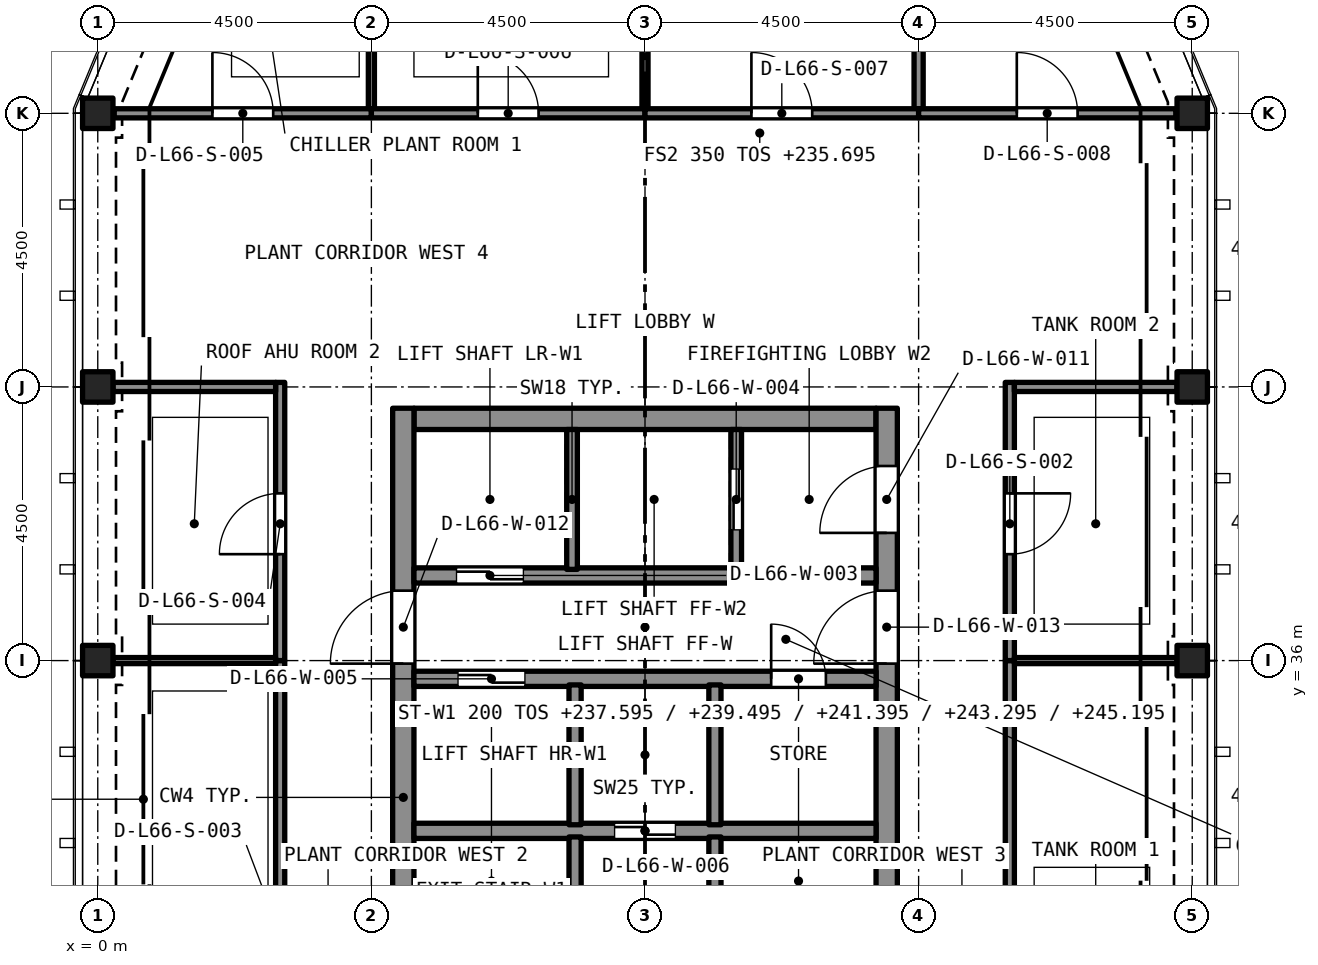
"""IFC4 building model, lengths in metres.
Left out: names, types, materials, properties, quantities, classifications, styles, units other than length and angle.
Written with IfcOpenShell. Run it as: python <this file> out.ifc"""

import sys

from ifc_helpers import new_model, si_unit, direction, frame, frame_2d, origin, origin_2d, place, context, subcontext, project, spatial, rectangle, hollow_rectangle, extrude, element, fill, save


model = new_model("IFC4")
c1 = context("Model", 3, precision=1e-05, world=origin(), true_north=direction((0.0, 1.0)))
c2 = subcontext(c1, "Body", "Model", "MODEL_VIEW")
j1 = project(units=[si_unit("LENGTHUNIT", "METRE"), si_unit("PLANEANGLEUNIT", "RADIAN")], contexts=[c1])
p1 = place(None, origin())
s1 = spatial("IfcSite", under=j1, at=p1, CompositionType="ELEMENT")
p2 = place(p1, origin())
s2 = spatial("IfcBuilding", under=s1, at=p2, CompositionType="ELEMENT")
p3 = place(p2, frame((0.0, 0.0, 235.695)))
s3 = spatial("IfcBuildingStorey", under=s2, at=p3, CompositionType="ELEMENT", Elevation=235.695)
p4 = place(p3, frame((5.2, 39.975, 0.0), z_axis=(0.0, 0.0, 1.0), x_axis=(1.0, 0.0, 0.0)))
e1 = element("IfcWall", 1, at=p4, inside=s3, PredefinedType="SOLIDWALL", context=c2, shape_type="SweptSolid", body=[
    extrude(rectangle(XDim=7.6, YDim=0.35, at=frame_2d((3.8, 0.0))), origin(), (0.0, 0.0, 1.0), 11.4),
])
p5 = place(p3, frame((5.025, 27.35, 0.0), z_axis=(0.0, 0.0, 1.0), x_axis=(0.0, 1.0, 0.0)))
e2 = element("IfcWall", 2, at=p5, inside=s3, PredefinedType="SOLIDWALL", context=c2, shape_type="SweptSolid", body=[
    extrude(rectangle(XDim=12.8, YDim=0.35, at=frame_2d((6.4, 0.0))), origin(), (0.0, 0.0, 1.0), 11.4),
])
p6 = place(p5, frame((8.6, 0.0, 0.0)))
e3 = element("IfcOpeningElement", 3, at=p6, cuts=e2, PredefinedType="OPENING", context=c2, shape_type="SweptSolid", body=[
    extrude(rectangle(XDim=1.2, YDim=2.1, at=frame_2d((0.6, 1.05))), frame((0.0, 0.185, 0.0), z_axis=(0.0, -1.0, 0.0), x_axis=(1.0, 0.0, 0.0)), (0.0, 0.0, 1.0), 0.37),
])
p7 = place(p3, frame((12.975, 27.35, 0.0), z_axis=(0.0, 0.0, 1.0), x_axis=(0.0, 1.0, 0.0)))
e4 = element("IfcWall", 4, at=p7, inside=s3, PredefinedType="SOLIDWALL", context=c2, shape_type="SweptSolid", body=[
    extrude(rectangle(XDim=12.8, YDim=0.35, at=frame_2d((6.4, 0.0))), origin(), (0.0, 0.0, 1.0), 11.4),
])
p8 = place(p7, frame((10.75, 0.0, 0.0)))
e5 = element("IfcOpeningElement", 5, at=p8, cuts=e4, PredefinedType="OPENING", context=c2, shape_type="SweptSolid", body=[
    extrude(rectangle(XDim=1.1, YDim=2.1, at=frame_2d((0.55, 1.05))), frame((0.0, 0.185, 0.0), z_axis=(0.0, -1.0, 0.0), x_axis=(1.0, 0.0, 0.0)), (0.0, 0.0, 1.0), 0.37),
])
p9 = place(p7, frame((8.6, 0.0, 0.0)))
e6 = element("IfcOpeningElement", 6, at=p9, cuts=e4, PredefinedType="OPENING", context=c2, shape_type="SweptSolid", body=[
    extrude(rectangle(XDim=1.2, YDim=2.1, at=frame_2d((0.6, 1.05))), frame((0.0, 0.185, 0.0), z_axis=(0.0, -1.0, 0.0), x_axis=(1.0, 0.0, 0.0)), (0.0, 0.0, 1.0), 0.37),
])
for number, where, z_axis, x_axis in (
    (7, (0.0, 36.0, 0.0), (0.0, 0.0, 1.0), (1.0, 0.0, 0.0)),
    (8, (18.0, 36.0, 0.0), (0.0, 0.0, 1.0), (1.0, 0.0, 0.0)),
    (9, (0.0, 40.5, 0.0), (0.0, 0.0, 1.0), (1.0, 0.0, 0.0)),
    (10, (18.0, 40.5, 0.0), (0.0, 0.0, 1.0), (1.0, 0.0, 0.0)),
    (11, (0.0, 45.0, 0.0), (0.0, 0.0, 1.0), (1.0, 0.0, 0.0)),
    (12, (18.0, 45.0, 0.0), (0.0, 0.0, 1.0), (1.0, 0.0, 0.0)),
):
    element("IfcColumn", number, at=place(p3, frame(where, z_axis=z_axis, x_axis=x_axis)), inside=s3, PredefinedType="COLUMN", context=c2, shape_type="SweptSolid", body=[
        extrude(hollow_rectangle(XDim=0.5, YDim=0.5, WallThickness=0.04, at=origin_2d()), origin(), (0.0, 0.0, 1.0), 11.4),
    ])
p10 = place(p3, frame((5.2, 33.2, 0.0), z_axis=(0.0, 0.0, 1.0), x_axis=(1.0, 0.0, 0.0)))
e13 = element("IfcWall", 13, at=p10, inside=s3, PredefinedType="SOLIDWALL", context=c2, shape_type="SweptSolid", body=[
    extrude(rectangle(XDim=7.6, YDim=0.25, at=frame_2d((3.8, 0.0))), origin(), (0.0, 0.0, 1.0), 11.05),
])
p11 = place(p10, frame((3.3, 0.0, 0.0)))
e14 = element("IfcOpeningElement", 14, at=p11, cuts=e13, PredefinedType="OPENING", context=c2, shape_type="SweptSolid", body=[
    extrude(rectangle(XDim=1.0, YDim=2.1, at=frame_2d((0.5, 1.05))), frame((0.0, 0.135, 0.0), z_axis=(0.0, -1.0, 0.0), x_axis=(1.0, 0.0, 0.0)), (0.0, 0.0, 1.0), 0.27),
])
p12 = place(p3, frame((5.2, 35.7, 0.0), z_axis=(0.0, 0.0, 1.0), x_axis=(1.0, 0.0, 0.0)))
e15 = element("IfcWall", 15, at=p12, inside=s3, PredefinedType="SOLIDWALL", context=c2, shape_type="SweptSolid", body=[
    extrude(rectangle(XDim=7.6, YDim=0.25, at=frame_2d((3.8, 0.0))), origin(), (0.0, 0.0, 1.0), 11.05),
])
p13 = place(p12, frame((0.725, 0.0, 0.0)))
e16 = element("IfcOpeningElement", 16, at=p13, cuts=e15, PredefinedType="OPENING", context=c2, shape_type="SweptSolid", body=[
    extrude(rectangle(XDim=1.1, YDim=2.4, at=frame_2d((0.55, 1.2))), frame((0.0, 0.135, 0.0), z_axis=(0.0, -1.0, 0.0), x_axis=(1.0, 0.0, 0.0)), (0.0, 0.0, 1.0), 0.27),
])
p14 = place(p12, frame((5.875, 0.0, 0.0)))
e17 = element("IfcOpeningElement", 17, at=p14, cuts=e15, PredefinedType="OPENING", context=c2, shape_type="SweptSolid", body=[
    extrude(rectangle(XDim=0.9, YDim=2.1, at=frame_2d((0.45, 1.05))), frame((0.0, 0.135, 0.0), z_axis=(0.0, -1.0, 0.0), x_axis=(1.0, 0.0, 0.0)), (0.0, 0.0, 1.0), 0.27),
])
p15 = place(p3, frame((5.2, 37.4, 0.0), z_axis=(0.0, 0.0, 1.0), x_axis=(1.0, 0.0, 0.0)))
e18 = element("IfcWall", 18, at=p15, inside=s3, PredefinedType="SOLIDWALL", context=c2, shape_type="SweptSolid", body=[
    extrude(rectangle(XDim=7.6, YDim=0.25, at=frame_2d((3.8, 0.0))), origin(), (0.0, 0.0, 1.0), 11.05),
])
p16 = place(p15, frame((0.7, 0.0, 0.0)))
e19 = element("IfcOpeningElement", 19, at=p16, cuts=e18, PredefinedType="OPENING", context=c2, shape_type="SweptSolid", body=[
    extrude(rectangle(XDim=1.1, YDim=2.4, at=frame_2d((0.55, 1.2))), frame((0.0, 0.135, 0.0), z_axis=(0.0, -1.0, 0.0), x_axis=(1.0, 0.0, 0.0)), (0.0, 0.0, 1.0), 0.27),
])
p17 = place(p3, frame((7.85, 27.7, 0.0), z_axis=(0.0, 0.0, 1.0), x_axis=(0.0, 1.0, 0.0)))
e20 = element("IfcWall", 20, at=p17, inside=s3, PredefinedType="SOLIDWALL", context=c2, shape_type="SweptSolid", body=[
    extrude(rectangle(XDim=5.4, YDim=0.2, at=frame_2d((2.7, 0.0))), origin(), (0.0, 0.0, 1.0), 11.05),
])
p18 = place(p17, frame((0.2, 0.0, 0.0)))
e21 = element("IfcOpeningElement", 21, at=p18, cuts=e20, PredefinedType="OPENING", context=c2, shape_type="SweptSolid", body=[
    extrude(rectangle(XDim=0.9, YDim=2.1, at=frame_2d((0.45, 1.05))), frame((0.0, 0.11, 0.0), z_axis=(0.0, -1.0, 0.0), x_axis=(1.0, 0.0, 0.0)), (0.0, 0.0, 1.0), 0.22),
])
p19 = place(p3, frame((10.15, 27.7, 0.0), z_axis=(0.0, 0.0, 1.0), x_axis=(0.0, 1.0, 0.0)))
e22 = element("IfcWall", 22, at=p19, inside=s3, PredefinedType="SOLIDWALL", context=c2, shape_type="SweptSolid", body=[
    extrude(rectangle(XDim=5.4, YDim=0.2, at=frame_2d((2.7, 0.0))), origin(), (0.0, 0.0, 1.0), 11.05),
])
p20 = place(p19, frame((0.2, 0.0, 0.0)))
e23 = element("IfcOpeningElement", 23, at=p20, cuts=e22, PredefinedType="OPENING", context=c2, shape_type="SweptSolid", body=[
    extrude(rectangle(XDim=0.9, YDim=2.1, at=frame_2d((0.45, 1.05))), frame((0.0, 0.11, 0.0), z_axis=(0.0, -1.0, 0.0), x_axis=(1.0, 0.0, 0.0)), (0.0, 0.0, 1.0), 0.22),
])
for number, where, z_axis, x_axis in (
    (24, (7.85, 33.3, 0.0), (0.0, 0.0, 1.0), (0.0, 1.0, 0.0)),
    (25, (10.15, 33.3, 0.0), (0.0, 0.0, 1.0), (0.0, 1.0, 0.0)),
):
    element("IfcWall", number, at=place(p3, frame(where, z_axis=z_axis, x_axis=x_axis)), inside=s3, PredefinedType="SOLIDWALL", context=c2, shape_type="SweptSolid", body=[
        extrude(rectangle(XDim=2.3, YDim=0.2, at=frame_2d((1.15, 0.0))), origin(), (0.0, 0.0, 1.0), 11.05),
    ])
p21 = place(p3, frame((7.8, 37.5, 0.0), z_axis=(0.0, 0.0, 1.0), x_axis=(0.0, 1.0, 0.0)))
e26 = element("IfcWall", 26, at=p21, inside=s3, PredefinedType="SOLIDWALL", context=c2, shape_type="SweptSolid", body=[
    extrude(rectangle(XDim=2.3, YDim=0.175, at=frame_2d((1.15, 0.0))), origin(), (0.0, 0.0, 1.0), 11.05),
])
p22 = place(p3, frame((10.5, 37.5, 0.0), z_axis=(0.0, 0.0, 1.0), x_axis=(0.0, 1.0, 0.0)))
e27 = element("IfcWall", 27, at=p22, inside=s3, PredefinedType="SOLIDWALL", context=c2, shape_type="SweptSolid", body=[
    extrude(rectangle(XDim=2.3, YDim=0.175, at=frame_2d((1.15, 0.0))), origin(), (0.0, 0.0, 1.0), 11.05),
])
p23 = place(p22, frame((0.65, 0.0, 0.0)))
e28 = element("IfcOpeningElement", 28, at=p23, cuts=e27, PredefinedType="OPENING", context=c2, shape_type="SweptSolid", body=[
    extrude(rectangle(XDim=1.0, YDim=2.1, at=frame_2d((0.5, 1.05))), frame((0.0, 0.097, 0.0), z_axis=(0.0, -1.0, 0.0), x_axis=(1.0, 0.0, 0.0)), (0.0, 0.0, 1.0), 0.195),
])
p24 = place(p3, frame((15.0, 36.0, 0.0), z_axis=(0.0, 0.0, 1.0), x_axis=(0.0, -1.0, 0.0)))
e29 = element("IfcWall", 29, at=p24, inside=s3, PredefinedType="PARTITIONING", context=c2, shape_type="SweptSolid", body=[
    extrude(rectangle(XDim=9.075, YDim=0.15, at=frame_2d((4.538, 0.0))), origin(), (0.0, 0.0, 1.0), 11.05),
])
p25 = place(p24, frame((3.75, 0.0, 0.0)))
e30 = element("IfcOpeningElement", 30, at=p25, cuts=e29, PredefinedType="OPENING", context=c2, shape_type="SweptSolid", body=[
    extrude(rectangle(XDim=1.5, YDim=2.4, at=frame_2d((0.75, 1.2))), frame((0.0, 0.085, 0.0), z_axis=(0.0, -1.0, 0.0), x_axis=(1.0, 0.0, 0.0)), (0.0, 0.0, 1.0), 0.17),
])
p26 = place(p3, frame((15.0, 40.575, 0.0), z_axis=(0.0, 0.0, 1.0), x_axis=(0.0, -1.0, 0.0)))
e31 = element("IfcWall", 31, at=p26, inside=s3, PredefinedType="PARTITIONING", context=c2, shape_type="SweptSolid", body=[
    extrude(rectangle(XDim=4.575, YDim=0.15, at=frame_2d((2.288, 0.0))), origin(), (0.0, 0.0, 1.0), 11.05),
])
p27 = place(p26, frame((1.825, 0.0, 0.0)))
e32 = element("IfcOpeningElement", 32, at=p27, cuts=e31, PredefinedType="OPENING", context=c2, shape_type="SweptSolid", body=[
    extrude(rectangle(XDim=1.0, YDim=2.1, at=frame_2d((0.5, 1.05))), frame((0.0, 0.085, 0.0), z_axis=(0.0, -1.0, 0.0), x_axis=(1.0, 0.0, 0.0)), (0.0, 0.0, 1.0), 0.17),
])
p28 = place(p3, frame((3.0, 26.925, 0.0), z_axis=(0.0, 0.0, 1.0), x_axis=(0.0, 1.0, 0.0)))
e33 = element("IfcWall", 33, at=p28, inside=s3, PredefinedType="PARTITIONING", context=c2, shape_type="SweptSolid", body=[
    extrude(rectangle(XDim=9.075, YDim=0.15, at=frame_2d((4.538, 0.0))), origin(), (0.0, 0.0, 1.0), 11.05),
])
p29 = place(p28, frame((3.825, 0.0, 0.0)))
e34 = element("IfcOpeningElement", 34, at=p29, cuts=e33, PredefinedType="OPENING", context=c2, shape_type="SweptSolid", body=[
    extrude(rectangle(XDim=1.5, YDim=2.4, at=frame_2d((0.75, 1.2))), frame((0.0, 0.085, 0.0), z_axis=(0.0, -1.0, 0.0), x_axis=(1.0, 0.0, 0.0)), (0.0, 0.0, 1.0), 0.17),
])
p30 = place(p3, frame((3.0, 36.0, 0.0), z_axis=(0.0, 0.0, 1.0), x_axis=(0.0, 1.0, 0.0)))
e35 = element("IfcWall", 35, at=p30, inside=s3, PredefinedType="PARTITIONING", context=c2, shape_type="SweptSolid", body=[
    extrude(rectangle(XDim=4.575, YDim=0.15, at=frame_2d((2.288, 0.0))), origin(), (0.0, 0.0, 1.0), 11.05),
])
p31 = place(p30, frame((1.75, 0.0, 0.0)))
e36 = element("IfcOpeningElement", 36, at=p31, cuts=e35, PredefinedType="OPENING", context=c2, shape_type="SweptSolid", body=[
    extrude(rectangle(XDim=1.0, YDim=2.1, at=frame_2d((0.5, 1.05))), frame((0.0, 0.085, 0.0), z_axis=(0.0, -1.0, 0.0), x_axis=(1.0, 0.0, 0.0)), (0.0, 0.0, 1.0), 0.17),
])
p32 = place(p3, frame((4.5, 45.075, 0.0), z_axis=(0.0, 0.0, 1.0), x_axis=(0.0, 1.0, 0.0)))
e37 = element("IfcWall", 37, at=p32, inside=s3, PredefinedType="PARTITIONING", context=c2, shape_type="SweptSolid", body=[
    extrude(rectangle(XDim=4.155, YDim=0.1, at=frame_2d((2.077, 0.0))), origin(), (0.0, 0.0, 1.0), 11.05),
])
p33 = place(p3, frame((0.271, 45.0, 0.0), z_axis=(0.0, 0.0, 1.0), x_axis=(1.0, 0.0, 0.0)))
e38 = element("IfcWall", 38, at=p33, inside=s3, PredefinedType="PARTITIONING", context=c2, shape_type="SweptSolid", body=[
    extrude(rectangle(XDim=4.229, YDim=0.15, at=frame_2d((2.115, 0.0))), origin(), (0.0, 0.0, 1.0), 11.05),
])
p34 = place(p33, frame((1.615, 0.0, 0.0)))
e39 = element("IfcOpeningElement", 39, at=p34, cuts=e38, PredefinedType="OPENING", context=c2, shape_type="SweptSolid", body=[
    extrude(rectangle(XDim=1.0, YDim=2.1, at=frame_2d((0.5, 1.05))), frame((0.0, 0.085, 0.0), z_axis=(0.0, -1.0, 0.0), x_axis=(1.0, 0.0, 0.0)), (0.0, 0.0, 1.0), 0.17),
])
p35 = place(p3, frame((9.0, 45.075, 0.0), z_axis=(0.0, 0.0, 1.0), x_axis=(0.0, 1.0, 0.0)))
e40 = element("IfcWall", 40, at=p35, inside=s3, PredefinedType="PARTITIONING", context=c2, shape_type="SweptSolid", body=[
    extrude(rectangle(XDim=4.175, YDim=0.1, at=frame_2d((2.087, 0.0))), origin(), (0.0, 0.0, 1.0), 11.05),
])
p36 = place(p3, frame((4.5, 45.0, 0.0), z_axis=(0.0, 0.0, 1.0), x_axis=(1.0, 0.0, 0.0)))
e41 = element("IfcWall", 41, at=p36, inside=s3, PredefinedType="PARTITIONING", context=c2, shape_type="SweptSolid", body=[
    extrude(rectangle(XDim=4.5, YDim=0.15, at=frame_2d((2.25, 0.0))), origin(), (0.0, 0.0, 1.0), 11.05),
])
p37 = place(p36, frame((1.75, 0.0, 0.0)))
e42 = element("IfcOpeningElement", 42, at=p37, cuts=e41, PredefinedType="OPENING", context=c2, shape_type="SweptSolid", body=[
    extrude(rectangle(XDim=1.0, YDim=2.1, at=frame_2d((0.5, 1.05))), frame((0.0, 0.085, 0.0), z_axis=(0.0, -1.0, 0.0), x_axis=(1.0, 0.0, 0.0)), (0.0, 0.0, 1.0), 0.17),
])
p38 = place(p3, frame((13.5, 45.075, 0.0), z_axis=(0.0, 0.0, 1.0), x_axis=(0.0, 1.0, 0.0)))
e43 = element("IfcWall", 43, at=p38, inside=s3, PredefinedType="PARTITIONING", context=c2, shape_type="SweptSolid", body=[
    extrude(rectangle(XDim=4.155, YDim=0.15, at=frame_2d((2.077, 0.0))), origin(), (0.0, 0.0, 1.0), 11.05),
])
p39 = place(p3, frame((9.0, 45.0, 0.0), z_axis=(0.0, 0.0, 1.0), x_axis=(1.0, 0.0, 0.0)))
e44 = element("IfcWall", 44, at=p39, inside=s3, PredefinedType="PARTITIONING", context=c2, shape_type="SweptSolid", body=[
    extrude(rectangle(XDim=4.5, YDim=0.15, at=frame_2d((2.25, 0.0))), origin(), (0.0, 0.0, 1.0), 11.05),
])
p40 = place(p39, frame((1.75, 0.0, 0.0)))
e45 = element("IfcOpeningElement", 45, at=p40, cuts=e44, PredefinedType="OPENING", context=c2, shape_type="SweptSolid", body=[
    extrude(rectangle(XDim=1.0, YDim=2.1, at=frame_2d((0.5, 1.05))), frame((0.0, 0.085, 0.0), z_axis=(0.0, -1.0, 0.0), x_axis=(1.0, 0.0, 0.0)), (0.0, 0.0, 1.0), 0.17),
])
p41 = place(p3, frame((13.5, 45.0, 0.0), z_axis=(0.0, 0.0, 1.0), x_axis=(1.0, 0.0, 0.0)))
e46 = element("IfcWall", 46, at=p41, inside=s3, PredefinedType="PARTITIONING", context=c2, shape_type="SweptSolid", body=[
    extrude(rectangle(XDim=4.229, YDim=0.15, at=frame_2d((2.115, 0.0))), origin(), (0.0, 0.0, 1.0), 11.05),
])
p42 = place(p41, frame((1.615, 0.0, 0.0)))
e47 = element("IfcOpeningElement", 47, at=p42, cuts=e46, PredefinedType="OPENING", context=c2, shape_type="SweptSolid", body=[
    extrude(rectangle(XDim=1.0, YDim=2.1, at=frame_2d((0.5, 1.05))), frame((0.0, 0.085, 0.0), z_axis=(0.0, -1.0, 0.0), x_axis=(1.0, 0.0, 0.0)), (0.0, 0.0, 1.0), 0.17),
])
for number, where, z_axis, x_axis in (
    (48, (15.075, 40.5, 0.0), (0.0, 0.0, 1.0), (1.0, 0.0, 0.0)),
    (49, (0.25, 40.5, 0.0), (0.0, 0.0, 1.0), (1.0, 0.0, 0.0)),
):
    element("IfcWall", number, at=place(p3, frame(where, z_axis=z_axis, x_axis=x_axis)), inside=s3, PredefinedType="PARTITIONING", context=c2, shape_type="SweptSolid", body=[
        extrude(rectangle(XDim=2.675, YDim=0.15, at=frame_2d((1.337, 0.0))), origin(), (0.0, 0.0, 1.0), 11.05),
    ])
for number, where, z_axis, x_axis in (
    (50, (15.075, 36.0, 0.0), (0.0, 0.0, 1.0), (1.0, 0.0, 0.0)),
    (51, (0.25, 36.0, 0.0), (0.0, 0.0, 1.0), (1.0, 0.0, 0.0)),
):
    element("IfcWall", number, at=place(p3, frame(where, z_axis=z_axis, x_axis=x_axis)), inside=s3, PredefinedType="PARTITIONING", context=c2, shape_type="SweptSolid", body=[
        extrude(rectangle(XDim=2.675, YDim=0.1, at=frame_2d((1.337, 0.0))), origin(), (0.0, 0.0, 1.0), 11.05),
    ])
p43 = place(p16, origin())
e52 = element("IfcDoor", 52, at=p43, inside=s3, OperationType="SLIDING_TO_LEFT", PredefinedType="DOOR", context=c2, shape_type="SweptSolid", body=[
    extrude(rectangle(XDim=1.1, YDim=2.4, at=frame_2d((0.55, 1.2))), frame((0.0, 0.025, 0.0), z_axis=(0.0, -1.0, 0.0), x_axis=(1.0, 0.0, 0.0)), (0.0, 0.0, 1.0), 0.05),
])
fill(e19, e52)
p44 = place(p23, origin())
e53 = element("IfcDoor", 53, at=p44, inside=s3, OperationType="SLIDING_TO_LEFT", PredefinedType="DOOR", context=c2, shape_type="SweptSolid", body=[
    extrude(rectangle(XDim=1.0, YDim=2.1, at=frame_2d((0.5, 1.05))), frame((0.0, 0.025, 0.0), z_axis=(0.0, -1.0, 0.0), x_axis=(1.0, 0.0, 0.0)), (0.0, 0.0, 1.0), 0.05),
])
fill(e28, e53)
p45 = place(p13, origin())
e54 = element("IfcDoor", 54, at=p45, inside=s3, OperationType="SLIDING_TO_LEFT", PredefinedType="DOOR", context=c2, shape_type="SweptSolid", body=[
    extrude(rectangle(XDim=1.1, YDim=2.4, at=frame_2d((0.55, 1.2))), frame((0.0, 0.025, 0.0), z_axis=(0.0, -1.0, 0.0), x_axis=(1.0, 0.0, 0.0)), (0.0, 0.0, 1.0), 0.05),
])
fill(e16, e54)
p46 = place(p11, origin())
e55 = element("IfcDoor", 55, at=p46, inside=s3, OperationType="SLIDING_TO_LEFT", PredefinedType="DOOR", context=c2, shape_type="SweptSolid", body=[
    extrude(rectangle(XDim=1.0, YDim=2.1, at=frame_2d((0.5, 1.05))), frame((0.0, 0.025, 0.0), z_axis=(0.0, -1.0, 0.0), x_axis=(1.0, 0.0, 0.0)), (0.0, 0.0, 1.0), 0.05),
])
fill(e14, e55)
p47 = place(p14, origin())
e56 = element("IfcDoor", 56, at=p47, inside=s3, OperationType="SINGLE_SWING_LEFT", PredefinedType="DOOR", context=c2, shape_type="SweptSolid", body=[
    extrude(rectangle(XDim=0.9, YDim=2.1, at=frame_2d((0.45, 1.05))), frame((0.0, 0.025, 0.0), z_axis=(0.0, -1.0, 0.0), x_axis=(1.0, 0.0, 0.0)), (0.0, 0.0, 1.0), 0.05),
])
fill(e17, e56)
p48 = place(p8, origin())
e57 = element("IfcDoor", 57, at=p48, inside=s3, OperationType="SINGLE_SWING_LEFT", PredefinedType="DOOR", context=c2, shape_type="SweptSolid", body=[
    extrude(rectangle(XDim=1.1, YDim=2.1, at=frame_2d((0.55, 1.05))), frame((0.0, 0.025, 0.0), z_axis=(0.0, -1.0, 0.0), x_axis=(1.0, 0.0, 0.0)), (0.0, 0.0, 1.0), 0.05),
])
fill(e5, e57)
p49 = place(p6, origin())
e58 = element("IfcDoor", 58, at=p49, inside=s3, OperationType="SINGLE_SWING_LEFT", PredefinedType="DOOR", context=c2, shape_type="SweptSolid", body=[
    extrude(rectangle(XDim=1.2, YDim=2.1, at=frame_2d((0.6, 1.05))), frame((0.0, 0.025, 0.0), z_axis=(0.0, -1.0, 0.0), x_axis=(1.0, 0.0, 0.0)), (0.0, 0.0, 1.0), 0.05),
])
fill(e3, e58)
p50 = place(p9, origin())
e59 = element("IfcDoor", 59, at=p50, inside=s3, OperationType="SINGLE_SWING_LEFT", PredefinedType="DOOR", context=c2, shape_type="SweptSolid", body=[
    extrude(rectangle(XDim=1.2, YDim=2.1, at=frame_2d((0.6, 1.05))), frame((0.0, 0.025, 0.0), z_axis=(0.0, -1.0, 0.0), x_axis=(1.0, 0.0, 0.0)), (0.0, 0.0, 1.0), 0.05),
])
fill(e6, e59)
p51 = place(p27, origin())
e60 = element("IfcDoor", 60, at=p51, inside=s3, OperationType="SINGLE_SWING_RIGHT", PredefinedType="DOOR", context=c2, shape_type="SweptSolid", body=[
    extrude(rectangle(XDim=1.0, YDim=2.1, at=frame_2d((0.5, 1.05))), frame((0.0, 0.025, 0.0), z_axis=(0.0, -1.0, 0.0), x_axis=(1.0, 0.0, 0.0)), (0.0, 0.0, 1.0), 0.05),
])
fill(e32, e60)
p52 = place(p31, origin())
e61 = element("IfcDoor", 61, at=p52, inside=s3, OperationType="SINGLE_SWING_LEFT", PredefinedType="DOOR", context=c2, shape_type="SweptSolid", body=[
    extrude(rectangle(XDim=1.0, YDim=2.1, at=frame_2d((0.5, 1.05))), frame((0.0, 0.025, 0.0), z_axis=(0.0, -1.0, 0.0), x_axis=(1.0, 0.0, 0.0)), (0.0, 0.0, 1.0), 0.05),
])
fill(e36, e61)
p53 = place(p34, origin())
e62 = element("IfcDoor", 62, at=p53, inside=s3, OperationType="SINGLE_SWING_RIGHT", PredefinedType="DOOR", context=c2, shape_type="SweptSolid", body=[
    extrude(rectangle(XDim=1.0, YDim=2.1, at=frame_2d((0.5, 1.05))), frame((0.0, 0.025, 0.0), z_axis=(0.0, -1.0, 0.0), x_axis=(1.0, 0.0, 0.0)), (0.0, 0.0, 1.0), 0.05),
])
fill(e39, e62)
p54 = place(p37, origin())
e63 = element("IfcDoor", 63, at=p54, inside=s3, OperationType="SINGLE_SWING_RIGHT", PredefinedType="DOOR", context=c2, shape_type="SweptSolid", body=[
    extrude(rectangle(XDim=1.0, YDim=2.1, at=frame_2d((0.5, 1.05))), frame((0.0, 0.025, 0.0), z_axis=(0.0, -1.0, 0.0), x_axis=(1.0, 0.0, 0.0)), (0.0, 0.0, 1.0), 0.05),
])
fill(e42, e63)
p55 = place(p40, origin())
e64 = element("IfcDoor", 64, at=p55, inside=s3, OperationType="SINGLE_SWING_RIGHT", PredefinedType="DOOR", context=c2, shape_type="SweptSolid", body=[
    extrude(rectangle(XDim=1.0, YDim=2.1, at=frame_2d((0.5, 1.05))), frame((0.0, 0.025, 0.0), z_axis=(0.0, -1.0, 0.0), x_axis=(1.0, 0.0, 0.0)), (0.0, 0.0, 1.0), 0.05),
])
fill(e45, e64)
p56 = place(p42, origin())
e65 = element("IfcDoor", 65, at=p56, inside=s3, OperationType="SINGLE_SWING_RIGHT", PredefinedType="DOOR", context=c2, shape_type="SweptSolid", body=[
    extrude(rectangle(XDim=1.0, YDim=2.1, at=frame_2d((0.5, 1.05))), frame((0.0, 0.025, 0.0), z_axis=(0.0, -1.0, 0.0), x_axis=(1.0, 0.0, 0.0)), (0.0, 0.0, 1.0), 0.05),
])
fill(e47, e65)
save(model, sys.argv[1])
